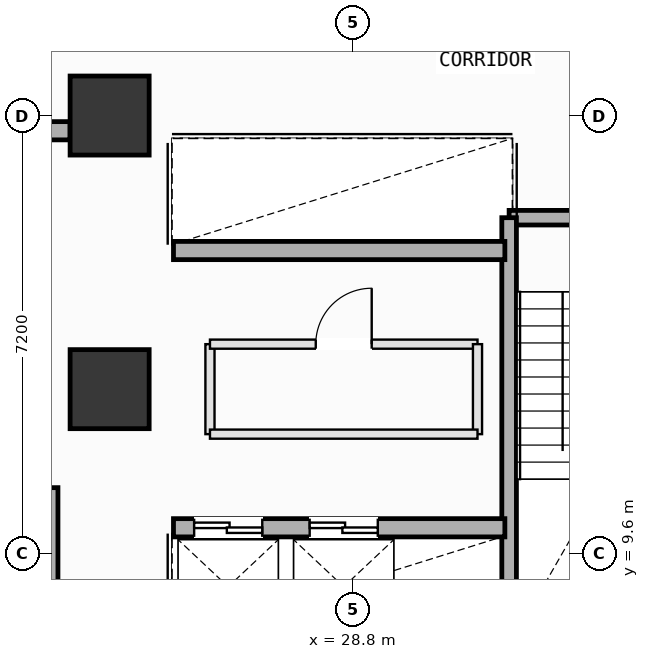
"""IFC4 building model, lengths in metres.
Left out: names, types, materials, properties, quantities, classifications, styles, units other than length and angle.
Written with IfcOpenShell. Run it as: python <this file> out.ifc"""

import sys

from ifc_helpers import new_model, si_unit, direction, frame, frame_2d, origin, origin_2d, place, context, subcontext, project, spatial, rectangle, extrude, element, fill, save


model = new_model("IFC4")
c1 = context("Model", 3, precision=1e-05, world=origin(), true_north=direction((0.0, 1.0)))
c2 = subcontext(c1, "Body", "Model", "MODEL_VIEW")
j1 = project(units=[si_unit("LENGTHUNIT", "METRE"), si_unit("PLANEANGLEUNIT", "RADIAN")], contexts=[c1])
p1 = place(None, origin())
s1 = spatial("IfcSite", under=j1, at=p1, CompositionType="ELEMENT")
p2 = place(p1, origin())
s2 = spatial("IfcBuilding", under=s1, at=p2, CompositionType="ELEMENT")
p3 = place(p2, frame((0.0, 0.0, 120.4)))
s3 = spatial("IfcBuildingStorey", under=s2, at=p3, CompositionType="ELEMENT", Elevation=120.4)
for number, where, z_axis, x_axis in (
    (1, (24.8, 12.3, 0.0), (0.0, 0.0, 1.0), (1.0, 0.0, 0.0)),
    (2, (24.8, 16.8, 0.0), (0.0, 0.0, 1.0), (1.0, 0.0, 0.0)),
):
    element("IfcColumn", number, at=place(p3, frame(where, z_axis=z_axis, x_axis=x_axis)), inside=s3, PredefinedType="COLUMN", context=c2, shape_type="SweptSolid", body=[
        extrude(rectangle(XDim=1.3, YDim=1.3, at=origin_2d()), origin(), (0.0, 0.0, 1.0), 4.0),
    ])
p4 = place(p3, frame((31.37, 15.12, 0.0), z_axis=(0.0, 0.0, 1.0), x_axis=(1.0, 0.0, 0.0)))
e3 = element("IfcWall", 3, at=p4, inside=s3, PredefinedType="SOLIDWALL", context=c2, shape_type="SweptSolid", body=[
    extrude(rectangle(XDim=3.46, YDim=0.24, at=frame_2d((1.73, 0.0))), origin(), (0.0, 0.0, 1.0), 3.78),
])
p5 = place(p4, frame((2.14, 0.0, 0.0)))
e4 = element("IfcOpeningElement", 4, at=p5, cuts=e3, PredefinedType="OPENING", context=c2, shape_type="SweptSolid", body=[
    extrude(rectangle(XDim=1.1, YDim=2.15, at=frame_2d((0.55, 1.075))), frame((0.0, 0.13, 0.0), z_axis=(0.0, -1.0, 0.0), x_axis=(1.0, 0.0, 0.0)), (0.0, 0.0, 1.0), 0.26),
])
p6 = place(p3, frame((31.37, 8.125, 0.0), z_axis=(0.0, 0.0, 1.0), x_axis=(0.0, 1.0, 0.0)))
e5 = element("IfcWall", 5, at=p6, inside=s3, PredefinedType="SOLIDWALL", context=c2, shape_type="SweptSolid", body=[
    extrude(rectangle(XDim=6.995, YDim=0.24, at=frame_2d((3.498, 0.0))), origin(), (0.0, 0.0, 1.0), 3.78),
])
p7 = place(p3, frame((19.85, 16.55, 0.0), z_axis=(0.0, 0.0, 1.0), x_axis=(1.0, 0.0, 0.0)))
e6 = element("IfcWall", 6, at=p7, inside=s3, PredefinedType="SOLIDWALL", context=c2, shape_type="SweptSolid", body=[
    extrude(rectangle(XDim=4.3, YDim=0.3, at=frame_2d((2.15, 0.0))), origin(), (0.0, 0.0, 1.0), 3.78),
])
p8 = place(p7, frame((0.475, 0.0, 0.0)))
e7 = element("IfcOpeningElement", 7, at=p8, cuts=e6, PredefinedType="OPENING", context=c2, shape_type="SweptSolid", body=[
    extrude(rectangle(XDim=1.25, YDim=2.18, at=frame_2d((0.625, 1.09))), frame((0.0, 0.16, 0.0), z_axis=(0.0, -1.0, 0.0), x_axis=(1.0, 0.0, 0.0)), (0.0, 0.0, 1.0), 0.32),
])
p9 = place(p7, frame((2.49, 0.0, 0.0)))
e8 = element("IfcOpeningElement", 8, at=p9, cuts=e6, PredefinedType="OPENING", context=c2, shape_type="SweptSolid", body=[
    extrude(rectangle(XDim=1.02, YDim=2.12, at=frame_2d((0.51, 1.06))), frame((0.0, 0.16, 0.0), z_axis=(0.0, -1.0, 0.0), x_axis=(1.0, 0.0, 0.0)), (0.0, 0.0, 1.0), 0.32),
])
p10 = place(p3, frame((23.8, 8.125, 0.0), z_axis=(0.0, 0.0, 1.0), x_axis=(0.0, 1.0, 0.0)))
e9 = element("IfcWall", 9, at=p10, inside=s3, PredefinedType="SOLIDWALL", context=c2, shape_type="SweptSolid", body=[
    extrude(rectangle(XDim=2.555, YDim=0.3, at=frame_2d((1.277, 0.0))), origin(), (0.0, 0.0, 1.0), 3.78),
])
p11 = place(p3, frame((25.85, 10.02, 0.0), z_axis=(0.0, 0.0, 1.0), x_axis=(1.0, 0.0, 0.0)))
e10 = element("IfcWall", 10, at=p11, inside=s3, PredefinedType="SOLIDWALL", context=c2, shape_type="SweptSolid", body=[
    extrude(rectangle(XDim=5.45, YDim=0.3, at=frame_2d((2.725, 0.0))), origin(), (0.0, 0.0, 1.0), 3.78),
])
p12 = place(p11, frame((0.34, 0.0, 0.0)))
e11 = element("IfcOpeningElement", 11, at=p12, cuts=e10, PredefinedType="OPENING", context=c2, shape_type="SweptSolid", body=[
    extrude(rectangle(XDim=1.12, YDim=2.15, at=frame_2d((0.56, 1.075))), frame((0.0, 0.16, 0.0), z_axis=(0.0, -1.0, 0.0), x_axis=(1.0, 0.0, 0.0)), (0.0, 0.0, 1.0), 0.32),
])
p13 = place(p11, frame((2.24, 0.0, 0.0)))
e12 = element("IfcOpeningElement", 12, at=p13, cuts=e10, PredefinedType="OPENING", context=c2, shape_type="SweptSolid", body=[
    extrude(rectangle(XDim=1.12, YDim=2.15, at=frame_2d((0.56, 1.075))), frame((0.0, 0.16, 0.0), z_axis=(0.0, -1.0, 0.0), x_axis=(1.0, 0.0, 0.0)), (0.0, 0.0, 1.0), 0.32),
])
p14 = place(p3, frame((25.85, 14.58, 0.0), z_axis=(0.0, 0.0, 1.0), x_axis=(1.0, 0.0, 0.0)))
e13 = element("IfcWall", 13, at=p14, inside=s3, PredefinedType="SOLIDWALL", context=c2, shape_type="SweptSolid", body=[
    extrude(rectangle(XDim=5.45, YDim=0.3, at=frame_2d((2.725, 0.0))), origin(), (0.0, 0.0, 1.0), 3.78),
])
p15 = place(p3, frame((26.45, 11.56, 0.0), z_axis=(0.0, 0.0, 1.0), x_axis=(0.0, 1.0, 0.0)))
e14 = element("IfcWall", 14, at=p15, inside=s3, PredefinedType="PARTITIONING", context=c2, shape_type="SweptSolid", body=[
    extrude(rectangle(XDim=1.48, YDim=0.15, at=frame_2d((0.74, 0.0))), origin(), (0.0, 0.0, 1.0), 3.78),
])
p16 = place(p3, frame((26.45, 13.04, 0.0), z_axis=(0.0, 0.0, 1.0), x_axis=(1.0, 0.0, 0.0)))
e15 = element("IfcWall", 15, at=p16, inside=s3, PredefinedType="PARTITIONING", context=c2, shape_type="SweptSolid", body=[
    extrude(rectangle(XDim=4.4, YDim=0.15, at=frame_2d((2.2, 0.0))), origin(), (0.0, 0.0, 1.0), 3.78),
])
p17 = place(p16, frame((1.74, 0.0, 0.0)))
e16 = element("IfcOpeningElement", 16, at=p17, cuts=e15, PredefinedType="OPENING", context=c2, shape_type="SweptSolid", body=[
    extrude(rectangle(XDim=0.92, YDim=2.1, at=frame_2d((0.46, 1.05))), frame((0.0, 0.085, 0.0), z_axis=(0.0, -1.0, 0.0), x_axis=(1.0, 0.0, 0.0)), (0.0, 0.0, 1.0), 0.17),
])
p18 = place(p3, frame((30.85, 13.04, 0.0), z_axis=(0.0, 0.0, 1.0), x_axis=(0.0, -1.0, 0.0)))
e17 = element("IfcWall", 17, at=p18, inside=s3, PredefinedType="PARTITIONING", context=c2, shape_type="SweptSolid", body=[
    extrude(rectangle(XDim=1.48, YDim=0.15, at=frame_2d((0.74, 0.0))), origin(), (0.0, 0.0, 1.0), 3.78),
])
p19 = place(p3, frame((30.85, 11.56, 0.0), z_axis=(0.0, 0.0, 1.0), x_axis=(-1.0, 0.0, 0.0)))
e18 = element("IfcWall", 18, at=p19, inside=s3, PredefinedType="PARTITIONING", context=c2, shape_type="SweptSolid", body=[
    extrude(rectangle(XDim=4.4, YDim=0.15, at=frame_2d((2.2, 0.0))), origin(), (0.0, 0.0, 1.0), 3.78),
])
p20 = place(p12, origin())
e19 = element("IfcDoor", 19, at=p20, inside=s3, OperationType="DOUBLE_DOOR_SLIDING", PredefinedType="DOOR", context=c2, shape_type="SweptSolid", body=[
    extrude(rectangle(XDim=1.12, YDim=2.15, at=frame_2d((0.56, 1.075))), frame((0.0, 0.025, 0.0), z_axis=(0.0, -1.0, 0.0), x_axis=(1.0, 0.0, 0.0)), (0.0, 0.0, 1.0), 0.05),
])
fill(e11, e19)
p21 = place(p13, origin())
e20 = element("IfcDoor", 20, at=p21, inside=s3, OperationType="DOUBLE_DOOR_SLIDING", PredefinedType="DOOR", context=c2, shape_type="SweptSolid", body=[
    extrude(rectangle(XDim=1.12, YDim=2.15, at=frame_2d((0.56, 1.075))), frame((0.0, 0.025, 0.0), z_axis=(0.0, -1.0, 0.0), x_axis=(1.0, 0.0, 0.0)), (0.0, 0.0, 1.0), 0.05),
])
fill(e12, e20)
p22 = place(p17, origin())
e21 = element("IfcDoor", 21, at=p22, inside=s3, OperationType="SINGLE_SWING_RIGHT", PredefinedType="DOOR", context=c2, shape_type="SweptSolid", body=[
    extrude(rectangle(XDim=0.92, YDim=2.1, at=frame_2d((0.46, 1.05))), frame((0.0, 0.025, 0.0), z_axis=(0.0, -1.0, 0.0), x_axis=(1.0, 0.0, 0.0)), (0.0, 0.0, 1.0), 0.05),
])
fill(e16, e21)
save(model, sys.argv[1])
